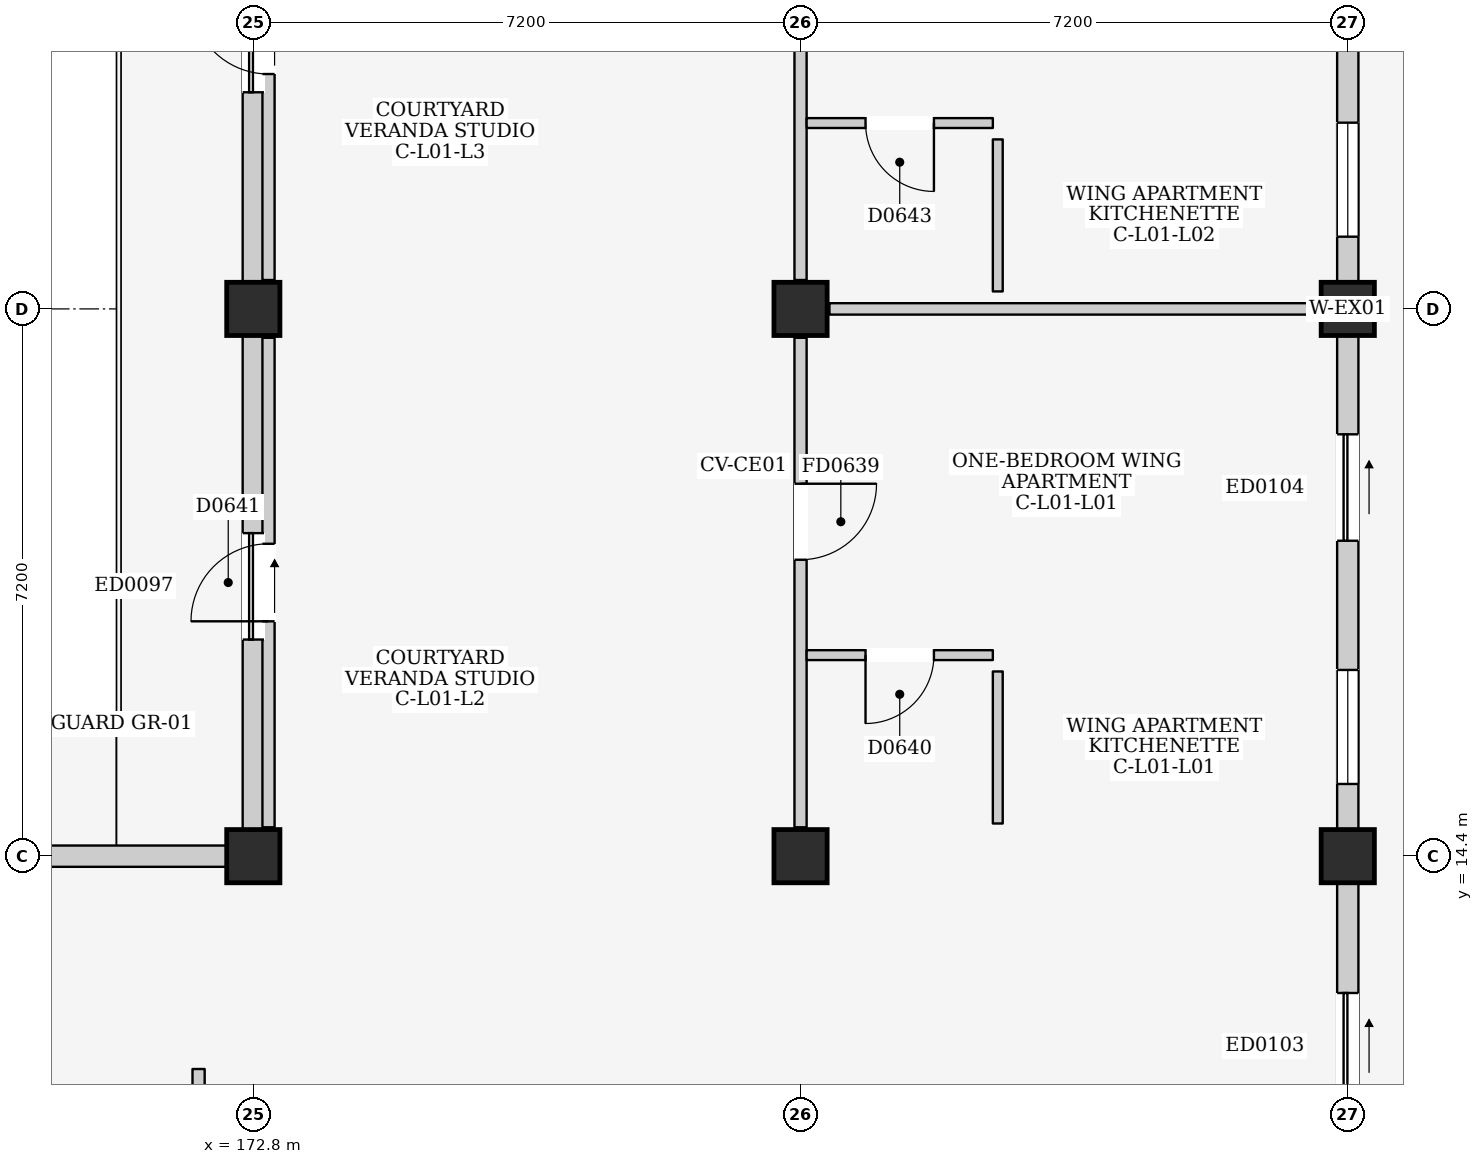
"""IFC4 building model, lengths in metres.
Left out: names, types, materials, properties, quantities, classifications, styles, units other than length and angle.
Written with IfcOpenShell. Run it as: python <this file> out.ifc"""

import sys

from ifc_helpers import new_model, si_unit, direction, frame, frame_2d, origin, origin_2d, place, context, subcontext, project, spatial, rectangle, extrude, element, fill, save


model = new_model("IFC4")
c1 = context("Model", 3, precision=1e-05, world=origin(), true_north=direction((0.0, 1.0)))
c2 = subcontext(c1, "Body", "Model", "MODEL_VIEW")
j1 = project(units=[si_unit("LENGTHUNIT", "METRE"), si_unit("PLANEANGLEUNIT", "RADIAN")], contexts=[c1])
p1 = place(None, origin())
s1 = spatial("IfcSite", under=j1, at=p1, CompositionType="ELEMENT")
p2 = place(p1, origin())
s2 = spatial("IfcBuilding", under=s1, at=p2, CompositionType="ELEMENT")
p3 = place(p2, frame((0.0, 0.0, 4.5)))
s3 = spatial("IfcBuildingStorey", under=s2, at=p3, CompositionType="ELEMENT", Elevation=4.5)
for number, where, z_axis, x_axis in (
    (1, (172.8, 14.4, 0.0), (0.0, 0.0, 1.0), (1.0, 0.0, 0.0)),
    (2, (172.8, 21.6, 0.0), (0.0, 0.0, 1.0), (1.0, 0.0, 0.0)),
    (3, (180.0, 14.4, 0.0), (0.0, 0.0, 1.0), (1.0, 0.0, 0.0)),
    (4, (180.0, 21.6, 0.0), (0.0, 0.0, 1.0), (1.0, 0.0, 0.0)),
    (5, (187.2, 14.4, 0.0), (0.0, 0.0, 1.0), (1.0, 0.0, 0.0)),
    (6, (187.2, 21.6, 0.0), (0.0, 0.0, 1.0), (1.0, 0.0, 0.0)),
):
    element("IfcColumn", number, at=place(p3, frame(where, z_axis=z_axis, x_axis=x_axis)), inside=s3, PredefinedType="COLUMN", context=c2, shape_type="SweptSolid", body=[
        extrude(rectangle(XDim=0.7, YDim=0.7, at=origin_2d()), origin(), (0.0, 0.0, 1.0), 4.5),
    ])
p4 = place(p3, frame((165.95, 14.4, 0.0), z_axis=(0.0, 0.0, 1.0), x_axis=(1.0, 0.0, 0.0)))
e7 = element("IfcWall", 7, at=p4, inside=s3, PredefinedType="ELEMENTEDWALL", context=c2, shape_type="SweptSolid", body=[
    extrude(rectangle(XDim=6.5, YDim=0.28, at=frame_2d((3.25, 0.0))), origin(), (0.0, 0.0, 1.0), 3.635),
])
p5 = place(p4, frame((2.75, 0.0, 1.2)))
e8 = element("IfcOpeningElement", 8, at=p5, cuts=e7, PredefinedType="OPENING", context=c2, shape_type="SweptSolid", body=[
    extrude(rectangle(XDim=1.0, YDim=0.9, at=frame_2d((0.5, 0.45))), frame((0.0, 0.155, 0.0), z_axis=(0.0, -1.0, 0.0), x_axis=(1.0, 0.0, 0.0)), (0.0, 0.0, 1.0), 0.31),
])
p6 = place(p3, frame((172.8, 14.75, 0.0), z_axis=(0.0, 0.0, 1.0), x_axis=(0.0, 1.0, 0.0)))
e9 = element("IfcWall", 9, at=p6, inside=s3, PredefinedType="ELEMENTEDWALL", context=c2, shape_type="SweptSolid", body=[
    extrude(rectangle(XDim=6.5, YDim=0.28, at=frame_2d((3.25, 0.0))), origin(), (0.0, 0.0, 1.0), 3.685),
])
p7 = place(p6, frame((2.5, 0.0, 0.0)))
e10 = element("IfcOpeningElement", 10, at=p7, cuts=e9, PredefinedType="OPENING", context=c2, shape_type="SweptSolid", body=[
    extrude(rectangle(XDim=1.4, YDim=2.1, at=frame_2d((0.7, 1.05))), frame((0.0, 0.155, 0.0), z_axis=(0.0, -1.0, 0.0), x_axis=(1.0, 0.0, 0.0)), (0.0, 0.0, 1.0), 0.31),
])
p8 = place(p3, frame((172.8, 21.95, 0.0), z_axis=(0.0, 0.0, 1.0), x_axis=(0.0, 1.0, 0.0)))
e11 = element("IfcWall", 11, at=p8, inside=s3, PredefinedType="ELEMENTEDWALL", context=c2, shape_type="SweptSolid", body=[
    extrude(rectangle(XDim=6.5, YDim=0.28, at=frame_2d((3.25, 0.0))), origin(), (0.0, 0.0, 1.0), 3.685),
])
p9 = place(p8, frame((2.5, 0.0, 0.0)))
e12 = element("IfcOpeningElement", 12, at=p9, cuts=e11, PredefinedType="OPENING", context=c2, shape_type="SweptSolid", body=[
    extrude(rectangle(XDim=1.4, YDim=2.1, at=frame_2d((0.7, 1.05))), frame((0.0, 0.155, 0.0), z_axis=(0.0, -1.0, 0.0), x_axis=(1.0, 0.0, 0.0)), (0.0, 0.0, 1.0), 0.31),
])
p10 = place(p3, frame((187.2, 7.55, 0.0), z_axis=(0.0, 0.0, 1.0), x_axis=(0.0, 1.0, 0.0)))
e13 = element("IfcWall", 13, at=p10, inside=s3, PredefinedType="ELEMENTEDWALL", context=c2, shape_type="SweptSolid", body=[
    extrude(rectangle(XDim=6.5, YDim=0.28, at=frame_2d((3.25, 0.0))), origin(), (0.0, 0.0, 1.0), 3.715),
])
p11 = place(p10, frame((3.65, 0.0, 0.0)))
e14 = element("IfcOpeningElement", 14, at=p11, cuts=e13, PredefinedType="OPENING", context=c2, shape_type="SweptSolid", body=[
    extrude(rectangle(XDim=1.4, YDim=2.1, at=frame_2d((0.7, 1.05))), frame((0.0, 0.155, 0.0), z_axis=(0.0, -1.0, 0.0), x_axis=(1.0, 0.0, 0.0)), (0.0, 0.0, 1.0), 0.31),
])
p12 = place(p3, frame((187.2, 14.75, 0.0), z_axis=(0.0, 0.0, 1.0), x_axis=(0.0, 1.0, 0.0)))
e15 = element("IfcWall", 15, at=p12, inside=s3, PredefinedType="ELEMENTEDWALL", context=c2, shape_type="SweptSolid", body=[
    extrude(rectangle(XDim=6.5, YDim=0.28, at=frame_2d((3.25, 0.0))), origin(), (0.0, 0.0, 1.0), 3.715),
])
p13 = place(p12, frame((3.8, 0.0, 0.0)))
e16 = element("IfcOpeningElement", 16, at=p13, cuts=e15, PredefinedType="OPENING", context=c2, shape_type="SweptSolid", body=[
    extrude(rectangle(XDim=1.4, YDim=2.1, at=frame_2d((0.7, 1.05))), frame((0.0, 0.155, 0.0), z_axis=(0.0, -1.0, 0.0), x_axis=(1.0, 0.0, 0.0)), (0.0, 0.0, 1.0), 0.31),
])
p14 = place(p12, frame((0.6, 0.0, 0.95)))
e17 = element("IfcOpeningElement", 17, at=p14, cuts=e15, PredefinedType="OPENING", context=c2, shape_type="SweptSolid", body=[
    extrude(rectangle(XDim=1.5, YDim=1.5, at=frame_2d((0.75, 0.75))), frame((0.0, 0.155, 0.0), z_axis=(0.0, -1.0, 0.0), x_axis=(1.0, 0.0, 0.0)), (0.0, 0.0, 1.0), 0.31),
])
p15 = place(p3, frame((187.2, 21.95, 0.0), z_axis=(0.0, 0.0, 1.0), x_axis=(0.0, 1.0, 0.0)))
e18 = element("IfcWall", 18, at=p15, inside=s3, PredefinedType="ELEMENTEDWALL", context=c2, shape_type="SweptSolid", body=[
    extrude(rectangle(XDim=6.5, YDim=0.28, at=frame_2d((3.25, 0.0))), origin(), (0.0, 0.0, 1.0), 3.715),
])
p16 = place(p15, frame((3.8, 0.0, 0.0)))
e19 = element("IfcOpeningElement", 19, at=p16, cuts=e18, PredefinedType="OPENING", context=c2, shape_type="SweptSolid", body=[
    extrude(rectangle(XDim=1.4, YDim=2.1, at=frame_2d((0.7, 1.05))), frame((0.0, 0.155, 0.0), z_axis=(0.0, -1.0, 0.0), x_axis=(1.0, 0.0, 0.0)), (0.0, 0.0, 1.0), 0.31),
])
p17 = place(p15, frame((0.6, 0.0, 0.95)))
e20 = element("IfcOpeningElement", 20, at=p17, cuts=e18, PredefinedType="OPENING", context=c2, shape_type="SweptSolid", body=[
    extrude(rectangle(XDim=1.5, YDim=1.5, at=frame_2d((0.75, 0.75))), frame((0.0, 0.155, 0.0), z_axis=(0.0, -1.0, 0.0), x_axis=(1.0, 0.0, 0.0)), (0.0, 0.0, 1.0), 0.31),
])
p18 = place(p3, frame((172.08, 7.28, 0.0), z_axis=(0.0, 0.0, 1.0), x_axis=(0.0, 1.0, 0.0)))
e21 = element("IfcWall", 21, at=p18, inside=s3, PredefinedType="PARTITIONING", context=c2, shape_type="SweptSolid", body=[
    extrude(rectangle(XDim=4.32, YDim=0.16, at=frame_2d((2.16, 0.0))), origin(), (0.0, 0.0, 1.0), 4.25),
])
p19 = place(p18, frame((0.72, 0.0, 0.0)))
e22 = element("IfcOpeningElement", 22, at=p19, cuts=e21, PredefinedType="OPENING", context=c2, shape_type="SweptSolid", body=[
    extrude(rectangle(XDim=1.2, YDim=2.2, at=frame_2d((0.6, 1.1))), frame((0.0, 0.095, 0.0), z_axis=(0.0, -1.0, 0.0), x_axis=(1.0, 0.0, 0.0)), (0.0, 0.0, 1.0), 0.19),
])
p20 = place(p3, frame((180.0, 14.78, 0.0), z_axis=(0.0, 0.0, 1.0), x_axis=(0.0, 1.0, 0.0)))
e23 = element("IfcWall", 23, at=p20, inside=s3, PredefinedType="PARTITIONING", context=c2, shape_type="SweptSolid", body=[
    extrude(rectangle(XDim=6.44, YDim=0.16, at=frame_2d((3.22, 0.0))), origin(), (0.0, 0.0, 1.0), 3.685),
])
p21 = place(p20, frame((3.52, 0.0, 0.0)))
e24 = element("IfcOpeningElement", 24, at=p21, cuts=e23, PredefinedType="OPENING", context=c2, shape_type="SweptSolid", body=[
    extrude(rectangle(XDim=1.0, YDim=2.15, at=frame_2d((0.5, 1.075))), frame((0.0, 0.095, 0.0), z_axis=(0.0, -1.0, 0.0), x_axis=(1.0, 0.0, 0.0)), (0.0, 0.0, 1.0), 0.19),
])
p22 = place(p3, frame((180.38, 21.6, 0.0), z_axis=(0.0, 0.0, 1.0), x_axis=(1.0, 0.0, 0.0)))
e25 = element("IfcWall", 25, at=p22, inside=s3, PredefinedType="PARTITIONING", context=c2, shape_type="SweptSolid", body=[
    extrude(rectangle(XDim=6.44, YDim=0.15, at=frame_2d((3.22, 0.0))), origin(), (0.0, 0.0, 1.0), 3.635),
])
p23 = place(p3, frame((180.08, 17.045, 0.0), z_axis=(0.0, 0.0, 1.0), x_axis=(1.0, 0.0, 0.0)))
e26 = element("IfcWall", 26, at=p23, inside=s3, PredefinedType="PARTITIONING", context=c2, shape_type="SweptSolid", body=[
    extrude(rectangle(XDim=2.45, YDim=0.13, at=frame_2d((1.225, 0.0))), origin(), (0.0, 0.0, 1.0), 4.25),
])
p24 = place(p23, frame((0.775, 0.0, 0.0)))
e27 = element("IfcOpeningElement", 27, at=p24, cuts=e26, PredefinedType="OPENING", context=c2, shape_type="SweptSolid", body=[
    extrude(rectangle(XDim=0.9, YDim=2.1, at=frame_2d((0.45, 1.05))), frame((0.0, 0.08, 0.0), z_axis=(0.0, -1.0, 0.0), x_axis=(1.0, 0.0, 0.0)), (0.0, 0.0, 1.0), 0.16),
])
p25 = place(p3, frame((182.595, 14.83, 0.0), z_axis=(0.0, 0.0, 1.0), x_axis=(0.0, 1.0, 0.0)))
e28 = element("IfcWall", 28, at=p25, inside=s3, PredefinedType="PARTITIONING", context=c2, shape_type="SweptSolid", body=[
    extrude(rectangle(XDim=2.0, YDim=0.13, at=frame_2d((1.0, 0.0))), origin(), (0.0, 0.0, 1.0), 4.25),
])
p26 = place(p3, frame((173.0, 14.78, 0.0), z_axis=(0.0, 0.0, 1.0), x_axis=(0.0, 1.0, 0.0)))
e29 = element("IfcWall", 29, at=p26, inside=s3, PredefinedType="PARTITIONING", context=c2, shape_type="SweptSolid", body=[
    extrude(rectangle(XDim=6.44, YDim=0.16, at=frame_2d((3.22, 0.0))), origin(), (0.0, 0.0, 1.0), 3.685),
])
p27 = place(p26, frame((2.71, 0.0, 0.0)))
e30 = element("IfcOpeningElement", 30, at=p27, cuts=e29, PredefinedType="OPENING", context=c2, shape_type="SweptSolid", body=[
    extrude(rectangle(XDim=1.02, YDim=2.18, at=frame_2d((0.51, 1.09))), frame((0.0, 0.095, 0.0), z_axis=(0.0, -1.0, 0.0), x_axis=(1.0, 0.0, 0.0)), (0.0, 0.0, 1.0), 0.19),
])
p28 = place(p3, frame((180.0, 21.98, 0.0), z_axis=(0.0, 0.0, 1.0), x_axis=(0.0, 1.0, 0.0)))
e31 = element("IfcWall", 31, at=p28, inside=s3, PredefinedType="PARTITIONING", context=c2, shape_type="SweptSolid", body=[
    extrude(rectangle(XDim=6.44, YDim=0.16, at=frame_2d((3.22, 0.0))), origin(), (0.0, 0.0, 1.0), 3.685),
])
p29 = place(p28, frame((3.52, 0.0, 0.0)))
e32 = element("IfcOpeningElement", 32, at=p29, cuts=e31, PredefinedType="OPENING", context=c2, shape_type="SweptSolid", body=[
    extrude(rectangle(XDim=1.0, YDim=2.15, at=frame_2d((0.5, 1.075))), frame((0.0, 0.095, 0.0), z_axis=(0.0, -1.0, 0.0), x_axis=(1.0, 0.0, 0.0)), (0.0, 0.0, 1.0), 0.19),
])
p30 = place(p3, frame((180.08, 24.045, 0.0), z_axis=(0.0, 0.0, 1.0), x_axis=(1.0, 0.0, 0.0)))
e33 = element("IfcWall", 33, at=p30, inside=s3, PredefinedType="PARTITIONING", context=c2, shape_type="SweptSolid", body=[
    extrude(rectangle(XDim=2.45, YDim=0.13, at=frame_2d((1.225, 0.0))), origin(), (0.0, 0.0, 1.0), 4.25),
])
p31 = place(p30, frame((0.775, 0.0, 0.0)))
e34 = element("IfcOpeningElement", 34, at=p31, cuts=e33, PredefinedType="OPENING", context=c2, shape_type="SweptSolid", body=[
    extrude(rectangle(XDim=0.9, YDim=2.1, at=frame_2d((0.45, 1.05))), frame((0.0, 0.08, 0.0), z_axis=(0.0, -1.0, 0.0), x_axis=(1.0, 0.0, 0.0)), (0.0, 0.0, 1.0), 0.16),
])
p32 = place(p3, frame((182.595, 21.83, 0.0), z_axis=(0.0, 0.0, 1.0), x_axis=(0.0, 1.0, 0.0)))
e35 = element("IfcWall", 35, at=p32, inside=s3, PredefinedType="PARTITIONING", context=c2, shape_type="SweptSolid", body=[
    extrude(rectangle(XDim=2.0, YDim=0.13, at=frame_2d((1.0, 0.0))), origin(), (0.0, 0.0, 1.0), 4.25),
])
p33 = place(p3, frame((173.0, 21.98, 0.0), z_axis=(0.0, 0.0, 1.0), x_axis=(0.0, 1.0, 0.0)))
e36 = element("IfcWall", 36, at=p33, inside=s3, PredefinedType="PARTITIONING", context=c2, shape_type="SweptSolid", body=[
    extrude(rectangle(XDim=6.44, YDim=0.16, at=frame_2d((3.22, 0.0))), origin(), (0.0, 0.0, 1.0), 3.685),
])
p34 = place(p33, frame((2.71, 0.0, 0.0)))
e37 = element("IfcOpeningElement", 37, at=p34, cuts=e36, PredefinedType="OPENING", context=c2, shape_type="SweptSolid", body=[
    extrude(rectangle(XDim=1.02, YDim=2.18, at=frame_2d((0.51, 1.09))), frame((0.0, 0.095, 0.0), z_axis=(0.0, -1.0, 0.0), x_axis=(1.0, 0.0, 0.0)), (0.0, 0.0, 1.0), 0.19),
])
p35 = place(p7, frame((1.4, 0.0, 0.0), z_axis=(0.0, 0.0, 1.0), x_axis=(-1.0, 0.0, 0.0)))
e38 = element("IfcDoor", 38, at=p35, inside=s3, OperationType="SLIDING_TO_RIGHT", PredefinedType="DOOR", context=c2, shape_type="SweptSolid", body=[
    extrude(rectangle(XDim=1.4, YDim=2.1, at=frame_2d((0.7, 1.05))), frame((0.0, 0.025, 0.0), z_axis=(0.0, -1.0, 0.0), x_axis=(1.0, 0.0, 0.0)), (0.0, 0.0, 1.0), 0.05),
])
fill(e10, e38)
p36 = place(p9, frame((1.4, 0.0, 0.0), z_axis=(0.0, 0.0, 1.0), x_axis=(-1.0, 0.0, 0.0)))
e39 = element("IfcDoor", 39, at=p36, inside=s3, OperationType="SLIDING_TO_RIGHT", PredefinedType="DOOR", context=c2, shape_type="SweptSolid", body=[
    extrude(rectangle(XDim=1.4, YDim=2.1, at=frame_2d((0.7, 1.05))), frame((0.0, 0.025, 0.0), z_axis=(0.0, -1.0, 0.0), x_axis=(1.0, 0.0, 0.0)), (0.0, 0.0, 1.0), 0.05),
])
fill(e12, e39)
p37 = place(p11, frame((1.4, 0.0, 0.0), z_axis=(0.0, 0.0, 1.0), x_axis=(-1.0, 0.0, 0.0)))
e40 = element("IfcDoor", 40, at=p37, inside=s3, OperationType="SLIDING_TO_RIGHT", PredefinedType="DOOR", context=c2, shape_type="SweptSolid", body=[
    extrude(rectangle(XDim=1.4, YDim=2.1, at=frame_2d((0.7, 1.05))), frame((0.0, 0.025, 0.0), z_axis=(0.0, -1.0, 0.0), x_axis=(1.0, 0.0, 0.0)), (0.0, 0.0, 1.0), 0.05),
])
fill(e14, e40)
p38 = place(p13, frame((1.4, 0.0, 0.0), z_axis=(0.0, 0.0, 1.0), x_axis=(-1.0, 0.0, 0.0)))
e41 = element("IfcDoor", 41, at=p38, inside=s3, OperationType="SLIDING_TO_RIGHT", PredefinedType="DOOR", context=c2, shape_type="SweptSolid", body=[
    extrude(rectangle(XDim=1.4, YDim=2.1, at=frame_2d((0.7, 1.05))), frame((0.0, 0.025, 0.0), z_axis=(0.0, -1.0, 0.0), x_axis=(1.0, 0.0, 0.0)), (0.0, 0.0, 1.0), 0.05),
])
fill(e16, e41)
p39 = place(p14, origin())
e42 = element("IfcWindow", 42, at=p39, inside=s3, PartitioningType="DOUBLE_PANEL_VERTICAL", PredefinedType="WINDOW", context=c2, shape_type="SweptSolid", body=[
    extrude(rectangle(XDim=1.5, YDim=1.5, at=frame_2d((0.75, 0.75))), frame((0.0, 0.03, 0.0), z_axis=(0.0, -1.0, 0.0), x_axis=(1.0, 0.0, 0.0)), (0.0, 0.0, 1.0), 0.06),
])
fill(e17, e42)
p40 = place(p17, origin())
e43 = element("IfcWindow", 43, at=p40, inside=s3, PartitioningType="DOUBLE_PANEL_VERTICAL", PredefinedType="WINDOW", context=c2, shape_type="SweptSolid", body=[
    extrude(rectangle(XDim=1.5, YDim=1.5, at=frame_2d((0.75, 0.75))), frame((0.0, 0.03, 0.0), z_axis=(0.0, -1.0, 0.0), x_axis=(1.0, 0.0, 0.0)), (0.0, 0.0, 1.0), 0.06),
])
fill(e20, e43)
p41 = place(p21, frame((1.0, 0.0, 0.0), z_axis=(0.0, 0.0, 1.0), x_axis=(-1.0, 0.0, 0.0)))
e44 = element("IfcDoor", 44, at=p41, inside=s3, OperationType="SINGLE_SWING_LEFT", PredefinedType="DOOR", context=c2, shape_type="SweptSolid", body=[
    extrude(rectangle(XDim=1.0, YDim=2.15, at=frame_2d((0.5, 1.075))), frame((0.0, 0.025, 0.0), z_axis=(0.0, -1.0, 0.0), x_axis=(1.0, 0.0, 0.0)), (0.0, 0.0, 1.0), 0.05),
])
fill(e24, e44)
p42 = place(p24, frame((0.9, 0.0, 0.0), z_axis=(0.0, 0.0, 1.0), x_axis=(-1.0, 0.0, 0.0)))
e45 = element("IfcDoor", 45, at=p42, inside=s3, OperationType="SINGLE_SWING_RIGHT", PredefinedType="DOOR", context=c2, shape_type="SweptSolid", body=[
    extrude(rectangle(XDim=0.9, YDim=2.1, at=frame_2d((0.45, 1.05))), frame((0.0, 0.025, 0.0), z_axis=(0.0, -1.0, 0.0), x_axis=(1.0, 0.0, 0.0)), (0.0, 0.0, 1.0), 0.05),
])
fill(e27, e45)
p43 = place(p27, origin())
e46 = element("IfcDoor", 46, at=p43, inside=s3, OperationType="SINGLE_SWING_LEFT", PredefinedType="DOOR", context=c2, shape_type="SweptSolid", body=[
    extrude(rectangle(XDim=1.02, YDim=2.18, at=frame_2d((0.51, 1.09))), frame((0.0, 0.025, 0.0), z_axis=(0.0, -1.0, 0.0), x_axis=(1.0, 0.0, 0.0)), (0.0, 0.0, 1.0), 0.05),
])
fill(e30, e46)
p44 = place(p31, frame((0.9, 0.0, 0.0), z_axis=(0.0, 0.0, 1.0), x_axis=(-1.0, 0.0, 0.0)))
e47 = element("IfcDoor", 47, at=p44, inside=s3, OperationType="SINGLE_SWING_LEFT", PredefinedType="DOOR", context=c2, shape_type="SweptSolid", body=[
    extrude(rectangle(XDim=0.9, YDim=2.1, at=frame_2d((0.45, 1.05))), frame((0.0, 0.025, 0.0), z_axis=(0.0, -1.0, 0.0), x_axis=(1.0, 0.0, 0.0)), (0.0, 0.0, 1.0), 0.05),
])
fill(e34, e47)
p45 = place(p34, origin())
e48 = element("IfcDoor", 48, at=p45, inside=s3, OperationType="SINGLE_SWING_RIGHT", PredefinedType="DOOR", context=c2, shape_type="SweptSolid", body=[
    extrude(rectangle(XDim=1.02, YDim=2.18, at=frame_2d((0.51, 1.09))), frame((0.0, 0.025, 0.0), z_axis=(0.0, -1.0, 0.0), x_axis=(1.0, 0.0, 0.0)), (0.0, 0.0, 1.0), 0.05),
])
fill(e37, e48)
save(model, sys.argv[1])
